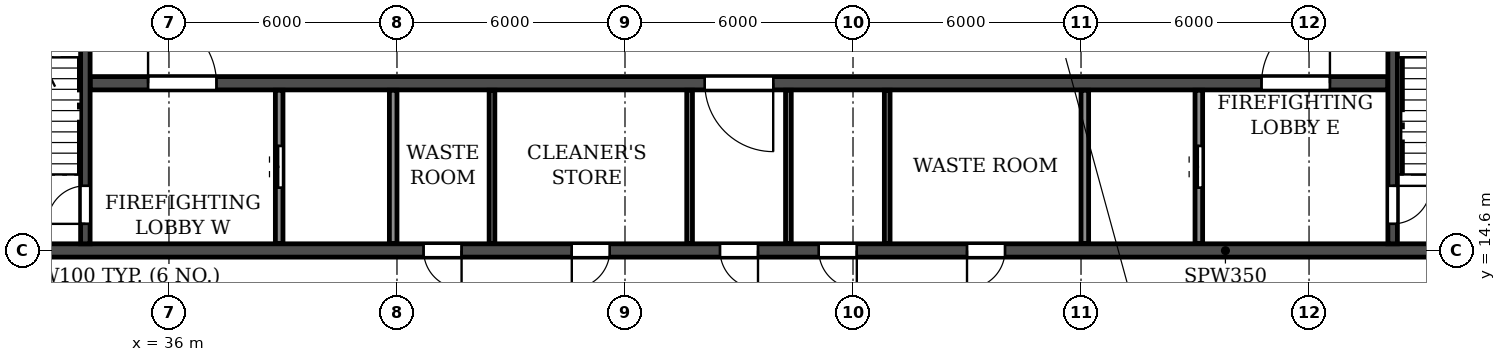
"""IFC4 building model, lengths in metres.
Left out: names, types, materials, properties, quantities, classifications, styles, units other than length and angle.
Written with IfcOpenShell. Run it as: python <this file> out.ifc"""

import sys

from ifc_helpers import new_model, si_unit, direction, frame, frame_2d, origin, place, context, subcontext, project, spatial, rectangle, extrude, element, fill, save


model = new_model("IFC4")
c1 = context("Model", 3, precision=1e-05, world=origin(), true_north=direction((0.0, 1.0)))
c2 = subcontext(c1, "Body", "Model", "MODEL_VIEW")
j1 = project(units=[si_unit("LENGTHUNIT", "METRE"), si_unit("PLANEANGLEUNIT", "RADIAN")], contexts=[c1])
p1 = place(None, origin())
s1 = spatial("IfcSite", under=j1, at=p1, CompositionType="ELEMENT")
p2 = place(p1, origin())
s2 = spatial("IfcBuilding", under=s1, at=p2, CompositionType="ELEMENT")
p3 = place(p2, frame((0.0, 0.0, 257.7)))
s3 = spatial("IfcBuildingStorey", under=s2, at=p3, CompositionType="ELEMENT", Elevation=257.7)
p4 = place(p3, frame((18.2, 14.6, 0.0), z_axis=(0.0, 0.0, 1.0), x_axis=(1.0, 0.0, 0.0)))
e1 = element("IfcWall", 1, at=p4, inside=s3, PredefinedType="SOLIDWALL", context=c2, shape_type="SweptSolid", body=[
    extrude(rectangle(XDim=65.6, YDim=0.35, at=frame_2d((32.8, 0.0))), origin(), (0.0, 0.0, 1.0), 3.0),
])
p5 = place(p4, frame((0.7, 0.0, 0.0)))
e2 = element("IfcOpeningElement", 2, at=p5, cuts=e1, PredefinedType="OPENING", context=c2, shape_type="SweptSolid", body=[
    extrude(rectangle(XDim=1.0, YDim=2.1, at=frame_2d((0.5, 1.05))), frame((0.0, 0.185, 0.0), z_axis=(0.0, -1.0, 0.0), x_axis=(1.0, 0.0, 0.0)), (0.0, 0.0, 1.0), 0.37),
])
p6 = place(p4, frame((8.6, 0.0, 0.0)))
e3 = element("IfcOpeningElement", 3, at=p6, cuts=e1, PredefinedType="OPENING", context=c2, shape_type="SweptSolid", body=[
    extrude(rectangle(XDim=1.0, YDim=2.1, at=frame_2d((0.5, 1.05))), frame((0.0, 0.185, 0.0), z_axis=(0.0, -1.0, 0.0), x_axis=(1.0, 0.0, 0.0)), (0.0, 0.0, 1.0), 0.37),
])
p7 = place(p4, frame((13.2, 0.0, 0.0)))
e4 = element("IfcOpeningElement", 4, at=p7, cuts=e1, PredefinedType="OPENING", context=c2, shape_type="SweptSolid", body=[
    extrude(rectangle(XDim=1.0, YDim=2.1, at=frame_2d((0.5, 1.05))), frame((0.0, 0.185, 0.0), z_axis=(0.0, -1.0, 0.0), x_axis=(1.0, 0.0, 0.0)), (0.0, 0.0, 1.0), 0.37),
])
p8 = place(p4, frame((24.5, 0.0, 0.0)))
e5 = element("IfcOpeningElement", 5, at=p8, cuts=e1, PredefinedType="OPENING", context=c2, shape_type="SweptSolid", body=[
    extrude(rectangle(XDim=1.0, YDim=2.1, at=frame_2d((0.5, 1.05))), frame((0.0, 0.185, 0.0), z_axis=(0.0, -1.0, 0.0), x_axis=(1.0, 0.0, 0.0)), (0.0, 0.0, 1.0), 0.37),
])
p9 = place(p4, frame((28.4, 0.0, 0.0)))
e6 = element("IfcOpeningElement", 6, at=p9, cuts=e1, PredefinedType="OPENING", context=c2, shape_type="SweptSolid", body=[
    extrude(rectangle(XDim=1.0, YDim=2.1, at=frame_2d((0.5, 1.05))), frame((0.0, 0.185, 0.0), z_axis=(0.0, -1.0, 0.0), x_axis=(1.0, 0.0, 0.0)), (0.0, 0.0, 1.0), 0.37),
])
p10 = place(p4, frame((32.3, 0.0, 0.0)))
e7 = element("IfcOpeningElement", 7, at=p10, cuts=e1, PredefinedType="OPENING", context=c2, shape_type="SweptSolid", body=[
    extrude(rectangle(XDim=1.0, YDim=2.1, at=frame_2d((0.5, 1.05))), frame((0.0, 0.185, 0.0), z_axis=(0.0, -1.0, 0.0), x_axis=(1.0, 0.0, 0.0)), (0.0, 0.0, 1.0), 0.37),
])
p11 = place(p4, frame((34.9, 0.0, 0.0)))
e8 = element("IfcOpeningElement", 8, at=p11, cuts=e1, PredefinedType="OPENING", context=c2, shape_type="SweptSolid", body=[
    extrude(rectangle(XDim=1.0, YDim=2.1, at=frame_2d((0.5, 1.05))), frame((0.0, 0.185, 0.0), z_axis=(0.0, -1.0, 0.0), x_axis=(1.0, 0.0, 0.0)), (0.0, 0.0, 1.0), 0.37),
])
p12 = place(p4, frame((38.8, 0.0, 0.0)))
e9 = element("IfcOpeningElement", 9, at=p12, cuts=e1, PredefinedType="OPENING", context=c2, shape_type="SweptSolid", body=[
    extrude(rectangle(XDim=1.0, YDim=2.1, at=frame_2d((0.5, 1.05))), frame((0.0, 0.185, 0.0), z_axis=(0.0, -1.0, 0.0), x_axis=(1.0, 0.0, 0.0)), (0.0, 0.0, 1.0), 0.37),
])
p13 = place(p4, frame((51.4, 0.0, 0.0)))
e10 = element("IfcOpeningElement", 10, at=p13, cuts=e1, PredefinedType="OPENING", context=c2, shape_type="SweptSolid", body=[
    extrude(rectangle(XDim=1.0, YDim=2.1, at=frame_2d((0.5, 1.05))), frame((0.0, 0.185, 0.0), z_axis=(0.0, -1.0, 0.0), x_axis=(1.0, 0.0, 0.0)), (0.0, 0.0, 1.0), 0.37),
])
p14 = place(p4, frame((56.0, 0.0, 0.0)))
e11 = element("IfcOpeningElement", 11, at=p14, cuts=e1, PredefinedType="OPENING", context=c2, shape_type="SweptSolid", body=[
    extrude(rectangle(XDim=1.0, YDim=2.1, at=frame_2d((0.5, 1.05))), frame((0.0, 0.185, 0.0), z_axis=(0.0, -1.0, 0.0), x_axis=(1.0, 0.0, 0.0)), (0.0, 0.0, 1.0), 0.37),
])
p15 = place(p4, frame((63.9, 0.0, 0.0)))
e12 = element("IfcOpeningElement", 12, at=p15, cuts=e1, PredefinedType="OPENING", context=c2, shape_type="SweptSolid", body=[
    extrude(rectangle(XDim=1.0, YDim=2.1, at=frame_2d((0.5, 1.05))), frame((0.0, 0.185, 0.0), z_axis=(0.0, -1.0, 0.0), x_axis=(1.0, 0.0, 0.0)), (0.0, 0.0, 1.0), 0.37),
])
p16 = place(p3, frame((33.925, 19.0, 0.0), z_axis=(0.0, 0.0, 1.0), x_axis=(1.0, 0.0, 0.0)))
e13 = element("IfcWall", 13, at=p16, inside=s3, PredefinedType="SOLIDWALL", context=c2, shape_type="SweptSolid", body=[
    extrude(rectangle(XDim=34.15, YDim=0.35, at=frame_2d((17.075, 0.0))), origin(), (0.0, 0.0, 1.0), 3.0),
])
p17 = place(p16, frame((16.175, 0.0, 0.0)))
e14 = element("IfcOpeningElement", 14, at=p17, cuts=e13, PredefinedType="OPENING", context=c2, shape_type="SweptSolid", body=[
    extrude(rectangle(XDim=1.8, YDim=2.1, at=frame_2d((0.9, 1.05))), frame((0.0, 0.185, 0.0), z_axis=(0.0, -1.0, 0.0), x_axis=(1.0, 0.0, 0.0)), (0.0, 0.0, 1.0), 0.37),
])
p18 = place(p16, frame((1.525, 0.0, 0.0)))
e15 = element("IfcOpeningElement", 15, at=p18, cuts=e13, PredefinedType="OPENING", context=c2, shape_type="SweptSolid", body=[
    extrude(rectangle(XDim=1.8, YDim=2.1, at=frame_2d((0.9, 1.05))), frame((0.0, 0.185, 0.0), z_axis=(0.0, -1.0, 0.0), x_axis=(1.0, 0.0, 0.0)), (0.0, 0.0, 1.0), 0.37),
])
p19 = place(p16, frame((30.825, 0.0, 0.0)))
e16 = element("IfcOpeningElement", 16, at=p19, cuts=e13, PredefinedType="OPENING", context=c2, shape_type="SweptSolid", body=[
    extrude(rectangle(XDim=1.8, YDim=2.1, at=frame_2d((0.9, 1.05))), frame((0.0, 0.185, 0.0), z_axis=(0.0, -1.0, 0.0), x_axis=(1.0, 0.0, 0.0)), (0.0, 0.0, 1.0), 0.37),
])
p20 = place(p3, frame((33.8, 14.775, 0.0), z_axis=(0.0, 0.0, 1.0), x_axis=(0.0, 1.0, 0.0)))
e17 = element("IfcWall", 17, at=p20, inside=s3, PredefinedType="SOLIDWALL", context=c2, shape_type="SweptSolid", body=[
    extrude(rectangle(XDim=7.7, YDim=0.25, at=frame_2d((3.85, 0.0))), origin(), (0.0, 0.0, 1.0), 3.0),
])
p21 = place(p20, frame((0.525, 0.0, 0.0)))
e18 = element("IfcOpeningElement", 18, at=p21, cuts=e17, PredefinedType="OPENING", context=c2, shape_type="SweptSolid", body=[
    extrude(rectangle(XDim=1.0, YDim=2.1, at=frame_2d((0.5, 1.05))), frame((0.0, 0.135, 0.0), z_axis=(0.0, -1.0, 0.0), x_axis=(1.0, 0.0, 0.0)), (0.0, 0.0, 1.0), 0.27),
])
p22 = place(p3, frame((68.2, 14.775, 0.0), z_axis=(0.0, 0.0, 1.0), x_axis=(0.0, 1.0, 0.0)))
e19 = element("IfcWall", 19, at=p22, inside=s3, PredefinedType="SOLIDWALL", context=c2, shape_type="SweptSolid", body=[
    extrude(rectangle(XDim=7.7, YDim=0.25, at=frame_2d((3.85, 0.0))), origin(), (0.0, 0.0, 1.0), 3.0),
])
p23 = place(p22, frame((0.525, 0.0, 0.0)))
e20 = element("IfcOpeningElement", 20, at=p23, cuts=e19, PredefinedType="OPENING", context=c2, shape_type="SweptSolid", body=[
    extrude(rectangle(XDim=1.0, YDim=2.1, at=frame_2d((0.5, 1.05))), frame((0.0, 0.135, 0.0), z_axis=(0.0, -1.0, 0.0), x_axis=(1.0, 0.0, 0.0)), (0.0, 0.0, 1.0), 0.27),
])
for number, where, z_axis, x_axis in (
    (21, (49.7, 14.785, 0.0), (0.0, 0.0, 1.0), (0.0, 1.0, 0.0)),
    (22, (52.3, 14.785, 0.0), (0.0, 0.0, 1.0), (0.0, 1.0, 0.0)),
    (23, (44.5, 14.785, 0.0), (0.0, 0.0, 1.0), (0.0, 1.0, 0.0)),
    (24, (54.9, 14.785, 0.0), (0.0, 0.0, 1.0), (0.0, 1.0, 0.0)),
):
    element("IfcWall", number, at=place(p3, frame(where, z_axis=z_axis, x_axis=x_axis)), inside=s3, PredefinedType="PARTITIONING", context=c2, shape_type="SweptSolid", body=[
        extrude(rectangle(XDim=4.03, YDim=0.15, at=frame_2d((2.015, 0.0))), origin(), (0.0, 0.0, 1.0), 3.0),
    ])
p24 = place(p3, frame((38.9, 14.785, 0.0), z_axis=(0.0, 0.0, 1.0), x_axis=(0.0, 1.0, 0.0)))
e25 = element("IfcWall", 25, at=p24, inside=s3, PredefinedType="PARTITIONING", context=c2, shape_type="SweptSolid", body=[
    extrude(rectangle(XDim=4.03, YDim=0.2, at=frame_2d((2.015, 0.0))), origin(), (0.0, 0.0, 1.0), 3.0),
])
p25 = place(p24, frame((1.465, 0.0, 0.0)))
e26 = element("IfcOpeningElement", 26, at=p25, cuts=e25, PredefinedType="OPENING", context=c2, shape_type="SweptSolid", body=[
    extrude(rectangle(XDim=1.1, YDim=2.1, at=frame_2d((0.55, 1.05))), frame((0.0, 0.11, 0.0), z_axis=(0.0, -1.0, 0.0), x_axis=(1.0, 0.0, 0.0)), (0.0, 0.0, 1.0), 0.22),
])
for number, where, z_axis, x_axis in (
    (27, (41.9, 14.785, 0.0), (0.0, 0.0, 1.0), (0.0, 1.0, 0.0)),
    (28, (60.1, 14.785, 0.0), (0.0, 0.0, 1.0), (0.0, 1.0, 0.0)),
):
    element("IfcWall", number, at=place(p3, frame(where, z_axis=z_axis, x_axis=x_axis)), inside=s3, PredefinedType="PARTITIONING", context=c2, shape_type="SweptSolid", body=[
        extrude(rectangle(XDim=4.03, YDim=0.2, at=frame_2d((2.015, 0.0))), origin(), (0.0, 0.0, 1.0), 3.0),
    ])
p26 = place(p3, frame((63.1, 14.785, 0.0), z_axis=(0.0, 0.0, 1.0), x_axis=(0.0, 1.0, 0.0)))
e29 = element("IfcWall", 29, at=p26, inside=s3, PredefinedType="PARTITIONING", context=c2, shape_type="SweptSolid", body=[
    extrude(rectangle(XDim=4.03, YDim=0.2, at=frame_2d((2.015, 0.0))), origin(), (0.0, 0.0, 1.0), 3.0),
])
p27 = place(p26, frame((1.465, 0.0, 0.0)))
e30 = element("IfcOpeningElement", 30, at=p27, cuts=e29, PredefinedType="OPENING", context=c2, shape_type="SweptSolid", body=[
    extrude(rectangle(XDim=1.1, YDim=2.1, at=frame_2d((0.55, 1.05))), frame((0.0, 0.11, 0.0), z_axis=(0.0, -1.0, 0.0), x_axis=(1.0, 0.0, 0.0)), (0.0, 0.0, 1.0), 0.22),
])
p28 = place(p8, frame((1.0, 0.0, 0.0), z_axis=(0.0, 0.0, 1.0), x_axis=(-1.0, 0.0, 0.0)))
e31 = element("IfcDoor", 31, at=p28, inside=s3, OperationType="SINGLE_SWING_LEFT", PredefinedType="DOOR", context=c2, shape_type="SweptSolid", body=[
    extrude(rectangle(XDim=1.0, YDim=2.1, at=frame_2d((0.5, 1.05))), frame((0.0, 0.025, 0.0), z_axis=(0.0, -1.0, 0.0), x_axis=(1.0, 0.0, 0.0)), (0.0, 0.0, 1.0), 0.05),
])
fill(e5, e31)
p29 = place(p9, frame((1.0, 0.0, 0.0), z_axis=(0.0, 0.0, 1.0), x_axis=(-1.0, 0.0, 0.0)))
e32 = element("IfcDoor", 32, at=p29, inside=s3, OperationType="SINGLE_SWING_RIGHT", PredefinedType="DOOR", context=c2, shape_type="SweptSolid", body=[
    extrude(rectangle(XDim=1.0, YDim=2.1, at=frame_2d((0.5, 1.05))), frame((0.0, 0.025, 0.0), z_axis=(0.0, -1.0, 0.0), x_axis=(1.0, 0.0, 0.0)), (0.0, 0.0, 1.0), 0.05),
])
fill(e6, e32)
p30 = place(p10, frame((1.0, 0.0, 0.0), z_axis=(0.0, 0.0, 1.0), x_axis=(-1.0, 0.0, 0.0)))
e33 = element("IfcDoor", 33, at=p30, inside=s3, OperationType="SINGLE_SWING_LEFT", PredefinedType="DOOR", context=c2, shape_type="SweptSolid", body=[
    extrude(rectangle(XDim=1.0, YDim=2.1, at=frame_2d((0.5, 1.05))), frame((0.0, 0.025, 0.0), z_axis=(0.0, -1.0, 0.0), x_axis=(1.0, 0.0, 0.0)), (0.0, 0.0, 1.0), 0.05),
])
fill(e7, e33)
p31 = place(p11, frame((1.0, 0.0, 0.0), z_axis=(0.0, 0.0, 1.0), x_axis=(-1.0, 0.0, 0.0)))
e34 = element("IfcDoor", 34, at=p31, inside=s3, OperationType="SINGLE_SWING_LEFT", PredefinedType="DOOR", context=c2, shape_type="SweptSolid", body=[
    extrude(rectangle(XDim=1.0, YDim=2.1, at=frame_2d((0.5, 1.05))), frame((0.0, 0.025, 0.0), z_axis=(0.0, -1.0, 0.0), x_axis=(1.0, 0.0, 0.0)), (0.0, 0.0, 1.0), 0.05),
])
fill(e8, e34)
p32 = place(p12, frame((1.0, 0.0, 0.0), z_axis=(0.0, 0.0, 1.0), x_axis=(-1.0, 0.0, 0.0)))
e35 = element("IfcDoor", 35, at=p32, inside=s3, OperationType="SINGLE_SWING_RIGHT", PredefinedType="DOOR", context=c2, shape_type="SweptSolid", body=[
    extrude(rectangle(XDim=1.0, YDim=2.1, at=frame_2d((0.5, 1.05))), frame((0.0, 0.025, 0.0), z_axis=(0.0, -1.0, 0.0), x_axis=(1.0, 0.0, 0.0)), (0.0, 0.0, 1.0), 0.05),
])
fill(e9, e35)
p33 = place(p27, origin())
e36 = element("IfcDoor", 36, at=p33, inside=s3, OperationType="DOUBLE_DOOR_SLIDING", PredefinedType="DOOR", context=c2, shape_type="SweptSolid", body=[
    extrude(rectangle(XDim=1.1, YDim=2.1, at=frame_2d((0.55, 1.05))), frame((0.0, 0.025, 0.0), z_axis=(0.0, -1.0, 0.0), x_axis=(1.0, 0.0, 0.0)), (0.0, 0.0, 1.0), 0.05),
])
fill(e30, e36)
p34 = place(p23, frame((1.0, 0.0, 0.0), z_axis=(0.0, 0.0, 1.0), x_axis=(-1.0, 0.0, 0.0)))
e37 = element("IfcDoor", 37, at=p34, inside=s3, OperationType="SINGLE_SWING_LEFT", PredefinedType="DOOR", context=c2, shape_type="SweptSolid", body=[
    extrude(rectangle(XDim=1.0, YDim=2.1, at=frame_2d((0.5, 1.05))), frame((0.0, 0.025, 0.0), z_axis=(0.0, -1.0, 0.0), x_axis=(1.0, 0.0, 0.0)), (0.0, 0.0, 1.0), 0.05),
])
fill(e20, e37)
p35 = place(p21, origin())
e38 = element("IfcDoor", 38, at=p35, inside=s3, OperationType="SINGLE_SWING_LEFT", PredefinedType="DOOR", context=c2, shape_type="SweptSolid", body=[
    extrude(rectangle(XDim=1.0, YDim=2.1, at=frame_2d((0.5, 1.05))), frame((0.0, 0.025, 0.0), z_axis=(0.0, -1.0, 0.0), x_axis=(1.0, 0.0, 0.0)), (0.0, 0.0, 1.0), 0.05),
])
fill(e18, e38)
p36 = place(p25, origin())
e39 = element("IfcDoor", 39, at=p36, inside=s3, OperationType="DOUBLE_DOOR_SLIDING", PredefinedType="DOOR", context=c2, shape_type="SweptSolid", body=[
    extrude(rectangle(XDim=1.1, YDim=2.1, at=frame_2d((0.55, 1.05))), frame((0.0, 0.025, 0.0), z_axis=(0.0, -1.0, 0.0), x_axis=(1.0, 0.0, 0.0)), (0.0, 0.0, 1.0), 0.05),
])
fill(e26, e39)
p37 = place(p17, frame((1.8, 0.0, 0.0), z_axis=(0.0, 0.0, 1.0), x_axis=(-1.0, 0.0, 0.0)))
e40 = element("IfcDoor", 40, at=p37, inside=s3, OperationType="DOUBLE_DOOR_SINGLE_SWING", PredefinedType="DOOR", context=c2, shape_type="SweptSolid", body=[
    extrude(rectangle(XDim=1.8, YDim=2.1, at=frame_2d((0.9, 1.05))), frame((0.0, 0.025, 0.0), z_axis=(0.0, -1.0, 0.0), x_axis=(1.0, 0.0, 0.0)), (0.0, 0.0, 1.0), 0.05),
])
fill(e14, e40)
p38 = place(p18, origin())
e41 = element("IfcDoor", 41, at=p38, inside=s3, OperationType="DOUBLE_DOOR_SINGLE_SWING", PredefinedType="DOOR", context=c2, shape_type="SweptSolid", body=[
    extrude(rectangle(XDim=1.8, YDim=2.1, at=frame_2d((0.9, 1.05))), frame((0.0, 0.025, 0.0), z_axis=(0.0, -1.0, 0.0), x_axis=(1.0, 0.0, 0.0)), (0.0, 0.0, 1.0), 0.05),
])
fill(e15, e41)
p39 = place(p19, origin())
e42 = element("IfcDoor", 42, at=p39, inside=s3, OperationType="DOUBLE_DOOR_SINGLE_SWING", PredefinedType="DOOR", context=c2, shape_type="SweptSolid", body=[
    extrude(rectangle(XDim=1.8, YDim=2.1, at=frame_2d((0.9, 1.05))), frame((0.0, 0.025, 0.0), z_axis=(0.0, -1.0, 0.0), x_axis=(1.0, 0.0, 0.0)), (0.0, 0.0, 1.0), 0.05),
])
fill(e16, e42)
save(model, sys.argv[1])
